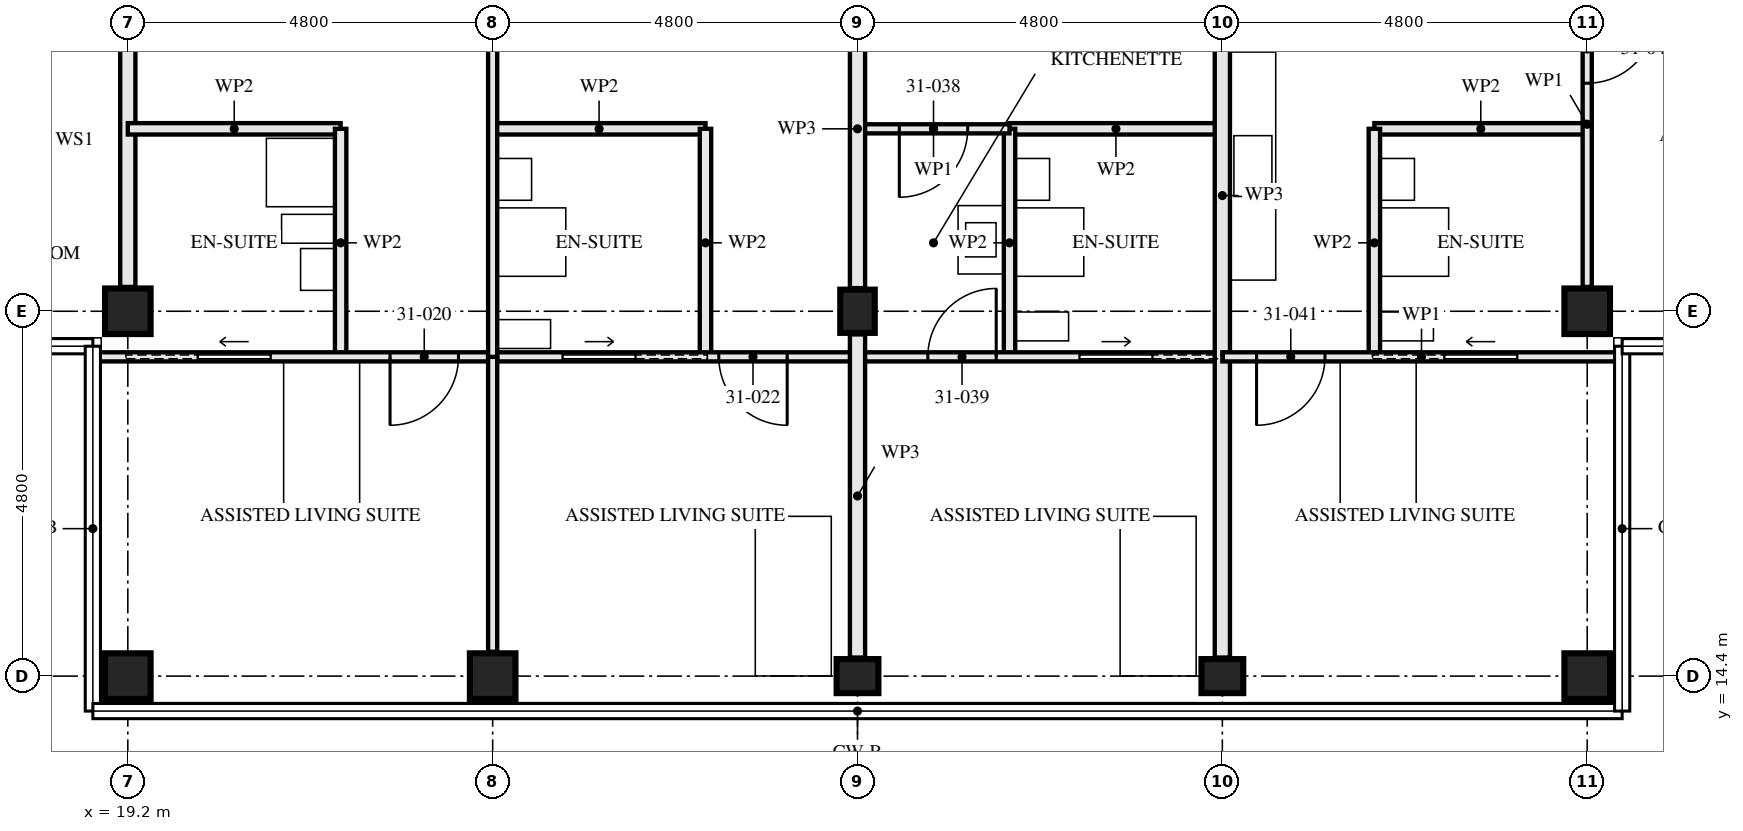
"""IFC4 building model, lengths in metres.
Left out: names, types, materials, properties, quantities, classifications, styles, units other than length and angle.
Written with IfcOpenShell. Run it as: python <this file> out.ifc"""

import sys

from ifc_helpers import new_model, si_unit, direction, frame, frame_2d, origin, origin_2d, place, context, subcontext, project, spatial, rectangle, hollow_rectangle, i_section, extrude, element, fill, save


model = new_model("IFC4")
c1 = context("Model", 3, precision=1e-05, world=origin(), true_north=direction((0.0, 1.0)))
c2 = subcontext(c1, "Body", "Model", "MODEL_VIEW")
j1 = project(units=[si_unit("LENGTHUNIT", "METRE"), si_unit("PLANEANGLEUNIT", "RADIAN")], contexts=[c1])
p1 = place(None, origin())
s1 = spatial("IfcSite", under=j1, at=p1, CompositionType="ELEMENT")
p2 = place(p1, origin())
s2 = spatial("IfcBuilding", under=s1, at=p2, CompositionType="ELEMENT")
p3 = place(p2, frame((0.0, 0.0, 115.5)))
s3 = spatial("IfcBuildingStorey", under=s2, at=p3, CompositionType="ELEMENT", Elevation=115.5)
for number, where, z_axis, x_axis in (
    (1, (19.2, 14.4, 0.0), (0.0, 0.0, 1.0), (0.0, 1.0, 0.0)),
    (2, (19.2, 19.2, 0.0), (0.0, 0.0, 1.0), (0.0, 1.0, 0.0)),
    (3, (24.0, 14.4, 0.0), (0.0, 0.0, 1.0), (0.0, 1.0, 0.0)),
):
    element("IfcColumn", number, at=place(p3, frame(where, z_axis=z_axis, x_axis=x_axis)), inside=s3, PredefinedType="COLUMN", context=c2, shape_type="SweptSolid", body=[
        extrude(hollow_rectangle(XDim=0.6, YDim=0.6, WallThickness=0.08, at=origin_2d()), origin(), (0.0, 0.0, 1.0), 3.5),
    ])
p4 = place(p3, frame((28.8, 14.4, 0.0), z_axis=(0.0, 0.0, 1.0), x_axis=(0.0, 1.0, 0.0)))
e4 = element("IfcColumn", 4, at=p4, inside=s3, PredefinedType="COLUMN", context=c2, shape_type="SweptSolid", body=[
    extrude(i_section(OverallWidth=0.448, OverallDepth=0.55, WebThickness=0.072, FlangeThickness=0.115, FilletRadius=0.015, at=origin_2d()), origin(), (0.0, 0.0, 1.0), 3.5),
])
p5 = place(p3, frame((28.8, 19.2, 0.0), z_axis=(0.0, 0.0, 1.0), x_axis=(1.0, 0.0, 0.0)))
e5 = element("IfcColumn", 5, at=p5, inside=s3, PredefinedType="COLUMN", context=c2, shape_type="SweptSolid", body=[
    extrude(i_section(OverallWidth=0.454, OverallDepth=0.569, WebThickness=0.078, FlangeThickness=0.125, FilletRadius=0.015, at=origin_2d()), origin(), (0.0, 0.0, 1.0), 3.5),
])
p6 = place(p3, frame((33.6, 14.4, 0.0), z_axis=(0.0, 0.0, 1.0), x_axis=(0.0, 1.0, 0.0)))
e6 = element("IfcColumn", 6, at=p6, inside=s3, PredefinedType="COLUMN", context=c2, shape_type="SweptSolid", body=[
    extrude(i_section(OverallWidth=0.448, OverallDepth=0.55, WebThickness=0.072, FlangeThickness=0.115, FilletRadius=0.015, at=origin_2d()), origin(), (0.0, 0.0, 1.0), 3.5),
])
for number, where, z_axis, x_axis in (
    (7, (38.4, 14.4, 0.0), (0.0, 0.0, 1.0), (0.0, 1.0, 0.0)),
    (8, (38.4, 19.2, 0.0), (0.0, 0.0, 1.0), (0.0, 1.0, 0.0)),
):
    element("IfcColumn", number, at=place(p3, frame(where, z_axis=z_axis, x_axis=x_axis)), inside=s3, PredefinedType="COLUMN", context=c2, shape_type="SweptSolid", body=[
        extrude(hollow_rectangle(XDim=0.6, YDim=0.6, WallThickness=0.05, at=origin_2d()), origin(), (0.0, 0.0, 1.0), 3.5),
    ])
p7 = place(p3, frame((19.2, 19.52, 0.0), z_axis=(0.0, 0.0, 1.0), x_axis=(0.0, 1.0, 0.0)))
e9 = element("IfcWall", 9, at=p7, inside=s3, PredefinedType="PARTITIONING", context=c2, shape_type="SweptSolid", body=[
    extrude(rectangle(XDim=7.28, YDim=0.2, at=frame_2d((3.64, 0.0))), origin(), (0.0, 0.0, 1.0), 2.55),
])
p8 = place(p3, frame((22.0, 18.6, 0.0), z_axis=(0.0, 0.0, 1.0), x_axis=(0.0, 1.0, 0.0)))
e10 = element("IfcWall", 10, at=p8, inside=s3, PredefinedType="PARTITIONING", context=c2, shape_type="SweptSolid", body=[
    extrude(rectangle(XDim=3.0, YDim=0.15, at=frame_2d((1.5, 0.0))), origin(), (0.0, 0.0, 1.0), 2.55),
])
p9 = place(p3, frame((19.2, 21.6, 0.0), z_axis=(0.0, 0.0, 1.0), x_axis=(1.0, 0.0, 0.0)))
e11 = element("IfcWall", 11, at=p9, inside=s3, PredefinedType="PARTITIONING", context=c2, shape_type="SweptSolid", body=[
    extrude(rectangle(XDim=2.8, YDim=0.15, at=frame_2d((1.4, 0.0))), origin(), (0.0, 0.0, 1.0), 3.33),
])
p10 = place(p3, frame((26.8, 18.6, 0.0), z_axis=(0.0, 0.0, 1.0), x_axis=(0.0, 1.0, 0.0)))
e12 = element("IfcWall", 12, at=p10, inside=s3, PredefinedType="PARTITIONING", context=c2, shape_type="SweptSolid", body=[
    extrude(rectangle(XDim=3.0, YDim=0.15, at=frame_2d((1.5, 0.0))), origin(), (0.0, 0.0, 1.0), 2.55),
])
p11 = place(p3, frame((24.0, 21.6, 0.0), z_axis=(0.0, 0.0, 1.0), x_axis=(1.0, 0.0, 0.0)))
e13 = element("IfcWall", 13, at=p11, inside=s3, PredefinedType="PARTITIONING", context=c2, shape_type="SweptSolid", body=[
    extrude(rectangle(XDim=2.8, YDim=0.15, at=frame_2d((1.4, 0.0))), origin(), (0.0, 0.0, 1.0), 3.33),
])
p12 = place(p3, frame((24.0, 18.6, 0.0), z_axis=(0.0, 0.0, 1.0), x_axis=(0.0, 1.0, 0.0)))
e14 = element("IfcWall", 14, at=p12, inside=s3, PredefinedType="PARTITIONING", context=c2, shape_type="SweptSolid", body=[
    extrude(rectangle(XDim=8.25, YDim=0.12, at=frame_2d((4.125, 0.0))), origin(), (0.0, 0.0, 1.0), 2.55),
])
p13 = place(p12, frame((5.15, 0.0, 0.0)))
e15 = element("IfcOpeningElement", 15, at=p13, cuts=e14, PredefinedType="OPENING", context=c2, shape_type="SweptSolid", body=[
    extrude(rectangle(XDim=0.9, YDim=2.1, at=frame_2d((0.45, 1.05))), frame((0.0, 0.071, 0.0), z_axis=(0.0, -1.0, 0.0), x_axis=(1.0, 0.0, 0.0)), (0.0, 0.0, 1.0), 0.141),
])
p14 = place(p3, frame((18.76, 18.6, 0.0), z_axis=(0.0, 0.0, 1.0), x_axis=(1.0, 0.0, 0.0)))
e16 = element("IfcWall", 16, at=p14, inside=s3, PredefinedType="PARTITIONING", context=c2, shape_type="SweptSolid", body=[
    extrude(rectangle(XDim=5.24, YDim=0.12, at=frame_2d((2.62, 0.0))), origin(), (0.0, 0.0, 1.0), 2.32),
])
p15 = place(p14, frame((3.89, 0.0, 0.0)))
e17 = element("IfcOpeningElement", 17, at=p15, cuts=e16, PredefinedType="OPENING", context=c2, shape_type="SweptSolid", body=[
    extrude(rectangle(XDim=0.9, YDim=2.1, at=frame_2d((0.45, 1.05))), frame((0.0, 0.071, 0.0), z_axis=(0.0, -1.0, 0.0), x_axis=(1.0, 0.0, 0.0)), (0.0, 0.0, 1.0), 0.141),
])
p16 = place(p14, frame((1.365, 0.0, 0.0)))
e18 = element("IfcOpeningElement", 18, at=p16, cuts=e16, PredefinedType="OPENING", context=c2, shape_type="SweptSolid", body=[
    extrude(rectangle(XDim=0.95, YDim=2.1, at=frame_2d((0.475, 1.05))), frame((0.0, 0.071, 0.0), z_axis=(0.0, -1.0, 0.0), x_axis=(1.0, 0.0, 0.0)), (0.0, 0.0, 1.0), 0.141),
])
p17 = place(p3, frame((24.0, 18.6, 0.0), z_axis=(0.0, 0.0, 1.0), x_axis=(1.0, 0.0, 0.0)))
e19 = element("IfcWall", 19, at=p17, inside=s3, PredefinedType="PARTITIONING", context=c2, shape_type="SweptSolid", body=[
    extrude(rectangle(XDim=4.8, YDim=0.12, at=frame_2d((2.4, 0.0))), origin(), (0.0, 0.0, 1.0), 3.33),
])
p18 = place(p17, frame((2.975, 0.0, 0.0)))
e20 = element("IfcOpeningElement", 20, at=p18, cuts=e19, PredefinedType="OPENING", context=c2, shape_type="SweptSolid", body=[
    extrude(rectangle(XDim=0.9, YDim=2.1, at=frame_2d((0.45, 1.05))), frame((0.0, 0.071, 0.0), z_axis=(0.0, -1.0, 0.0), x_axis=(1.0, 0.0, 0.0)), (0.0, 0.0, 1.0), 0.141),
])
p19 = place(p17, frame((0.925, 0.0, 0.0)))
e21 = element("IfcOpeningElement", 21, at=p19, cuts=e19, PredefinedType="OPENING", context=c2, shape_type="SweptSolid", body=[
    extrude(rectangle(XDim=0.95, YDim=2.1, at=frame_2d((0.475, 1.05))), frame((0.0, 0.071, 0.0), z_axis=(0.0, -1.0, 0.0), x_axis=(1.0, 0.0, 0.0)), (0.0, 0.0, 1.0), 0.141),
])
p20 = place(p3, frame((24.0, 14.72, 0.0), z_axis=(0.0, 0.0, 1.0), x_axis=(0.0, 1.0, 0.0)))
e22 = element("IfcWall", 22, at=p20, inside=s3, PredefinedType="PARTITIONING", context=c2, shape_type="SweptSolid", body=[
    extrude(rectangle(XDim=3.88, YDim=0.12, at=frame_2d((1.94, 0.0))), origin(), (0.0, 0.0, 1.0), 3.33),
])
p21 = place(p3, frame((30.8, 18.6, 0.0), z_axis=(0.0, 0.0, 1.0), x_axis=(0.0, 1.0, 0.0)))
e23 = element("IfcWall", 23, at=p21, inside=s3, PredefinedType="PARTITIONING", context=c2, shape_type="SweptSolid", body=[
    extrude(rectangle(XDim=3.0, YDim=0.15, at=frame_2d((1.5, 0.0))), origin(), (0.0, 0.0, 1.0), 2.55),
])
p22 = place(p3, frame((30.8, 21.6, 0.0), z_axis=(0.0, 0.0, 1.0), x_axis=(1.0, 0.0, 0.0)))
e24 = element("IfcWall", 24, at=p22, inside=s3, PredefinedType="PARTITIONING", context=c2, shape_type="SweptSolid", body=[
    extrude(rectangle(XDim=2.8, YDim=0.15, at=frame_2d((1.4, 0.0))), origin(), (0.0, 0.0, 1.0), 3.33),
])
p23 = place(p3, frame((28.8, 21.6, 0.0), z_axis=(0.0, 0.0, 1.0), x_axis=(1.0, 0.0, 0.0)))
e25 = element("IfcWall", 25, at=p23, inside=s3, PredefinedType="PARTITIONING", context=c2, shape_type="SweptSolid", body=[
    extrude(rectangle(XDim=2.0, YDim=0.12, at=frame_2d((1.0, 0.0))), origin(), (0.0, 0.0, 1.0), 3.33),
])
p24 = place(p23, frame((0.55, 0.0, 0.0)))
e26 = element("IfcOpeningElement", 26, at=p24, cuts=e25, PredefinedType="OPENING", context=c2, shape_type="SweptSolid", body=[
    extrude(rectangle(XDim=0.9, YDim=2.1, at=frame_2d((0.45, 1.05))), frame((0.0, 0.071, 0.0), z_axis=(0.0, -1.0, 0.0), x_axis=(1.0, 0.0, 0.0)), (0.0, 0.0, 1.0), 0.141),
])
p25 = place(p3, frame((28.8, 18.6, 0.0), z_axis=(0.0, 0.0, 1.0), x_axis=(1.0, 0.0, 0.0)))
e27 = element("IfcWall", 27, at=p25, inside=s3, PredefinedType="PARTITIONING", context=c2, shape_type="SweptSolid", body=[
    extrude(rectangle(XDim=4.8, YDim=0.12, at=frame_2d((2.4, 0.0))), origin(), (0.0, 0.0, 1.0), 3.33),
])
p26 = place(p25, frame((0.925, 0.0, 0.0)))
e28 = element("IfcOpeningElement", 28, at=p26, cuts=e27, PredefinedType="OPENING", context=c2, shape_type="SweptSolid", body=[
    extrude(rectangle(XDim=0.9, YDim=2.1, at=frame_2d((0.45, 1.05))), frame((0.0, 0.071, 0.0), z_axis=(0.0, -1.0, 0.0), x_axis=(1.0, 0.0, 0.0)), (0.0, 0.0, 1.0), 0.141),
])
p27 = place(p25, frame((2.925, 0.0, 0.0)))
e29 = element("IfcOpeningElement", 29, at=p27, cuts=e27, PredefinedType="OPENING", context=c2, shape_type="SweptSolid", body=[
    extrude(rectangle(XDim=0.95, YDim=2.1, at=frame_2d((0.475, 1.05))), frame((0.0, 0.071, 0.0), z_axis=(0.0, -1.0, 0.0), x_axis=(1.0, 0.0, 0.0)), (0.0, 0.0, 1.0), 0.141),
])
p28 = place(p3, frame((33.6, 14.644, 0.0), z_axis=(0.0, 0.0, 1.0), x_axis=(0.0, 1.0, 0.0)))
e30 = element("IfcWall", 30, at=p28, inside=s3, PredefinedType="PARTITIONING", context=c2, shape_type="SweptSolid", body=[
    extrude(rectangle(XDim=12.156, YDim=0.2, at=frame_2d((6.078, 0.0))), origin(), (0.0, 0.0, 1.0), 2.55),
])
p29 = place(p3, frame((35.6, 18.6, 0.0), z_axis=(0.0, 0.0, 1.0), x_axis=(0.0, 1.0, 0.0)))
e31 = element("IfcWall", 31, at=p29, inside=s3, PredefinedType="PARTITIONING", context=c2, shape_type="SweptSolid", body=[
    extrude(rectangle(XDim=3.0, YDim=0.15, at=frame_2d((1.5, 0.0))), origin(), (0.0, 0.0, 1.0), 2.55),
])
p30 = place(p3, frame((35.6, 21.6, 0.0), z_axis=(0.0, 0.0, 1.0), x_axis=(1.0, 0.0, 0.0)))
e32 = element("IfcWall", 32, at=p30, inside=s3, PredefinedType="PARTITIONING", context=c2, shape_type="SweptSolid", body=[
    extrude(rectangle(XDim=2.8, YDim=0.15, at=frame_2d((1.4, 0.0))), origin(), (0.0, 0.0, 1.0), 3.33),
])
p31 = place(p3, frame((33.6, 18.6, 0.0), z_axis=(0.0, 0.0, 1.0), x_axis=(1.0, 0.0, 0.0)))
e33 = element("IfcWall", 33, at=p31, inside=s3, PredefinedType="PARTITIONING", context=c2, shape_type="SweptSolid", body=[
    extrude(rectangle(XDim=5.24, YDim=0.12, at=frame_2d((2.62, 0.0))), origin(), (0.0, 0.0, 1.0), 2.32),
])
p32 = place(p31, frame((0.45, 0.0, 0.0)))
e34 = element("IfcOpeningElement", 34, at=p32, cuts=e33, PredefinedType="OPENING", context=c2, shape_type="SweptSolid", body=[
    extrude(rectangle(XDim=0.9, YDim=2.1, at=frame_2d((0.45, 1.05))), frame((0.0, 0.071, 0.0), z_axis=(0.0, -1.0, 0.0), x_axis=(1.0, 0.0, 0.0)), (0.0, 0.0, 1.0), 0.141),
])
p33 = place(p31, frame((2.925, 0.0, 0.0)))
e35 = element("IfcOpeningElement", 35, at=p33, cuts=e33, PredefinedType="OPENING", context=c2, shape_type="SweptSolid", body=[
    extrude(rectangle(XDim=0.95, YDim=2.1, at=frame_2d((0.475, 1.05))), frame((0.0, 0.071, 0.0), z_axis=(0.0, -1.0, 0.0), x_axis=(1.0, 0.0, 0.0)), (0.0, 0.0, 1.0), 0.141),
])
p34 = place(p3, frame((38.4, 19.52, 0.0), z_axis=(0.0, 0.0, 1.0), x_axis=(0.0, 1.0, 0.0)))
e36 = element("IfcWall", 36, at=p34, inside=s3, PredefinedType="PARTITIONING", context=c2, shape_type="SweptSolid", body=[
    extrude(rectangle(XDim=4.28, YDim=0.12, at=frame_2d((2.14, 0.0))), origin(), (0.0, 0.0, 1.0), 3.33),
])
p35 = place(p34, frame((2.68, 0.0, 0.0)))
e37 = element("IfcOpeningElement", 37, at=p35, cuts=e36, PredefinedType="OPENING", context=c2, shape_type="SweptSolid", body=[
    extrude(rectangle(XDim=0.9, YDim=2.1, at=frame_2d((0.45, 1.05))), frame((0.0, 0.071, 0.0), z_axis=(0.0, -1.0, 0.0), x_axis=(1.0, 0.0, 0.0)), (0.0, 0.0, 1.0), 0.141),
])
p36 = place(p3, frame((28.8, 14.644, 0.0), z_axis=(0.0, 0.0, 1.0), x_axis=(0.0, 1.0, 0.0)))
e38 = element("IfcWall", 38, at=p36, inside=s3, PredefinedType="PARTITIONING", context=c2, shape_type="SweptSolid", body=[
    extrude(rectangle(XDim=4.251, YDim=0.2, at=frame_2d((2.126, 0.0))), origin(), (0.0, 0.0, 1.0), 2.32),
])
p37 = place(p3, frame((28.8, 19.504, 0.0), z_axis=(0.0, 0.0, 1.0), x_axis=(0.0, 1.0, 0.0)))
e39 = element("IfcWall", 39, at=p37, inside=s3, PredefinedType="PARTITIONING", context=c2, shape_type="SweptSolid", body=[
    extrude(rectangle(XDim=4.191, YDim=0.2, at=frame_2d((2.096, 0.0))), origin(), (0.0, 0.0, 1.0), 2.32),
])
p38 = place(p15, frame((0.9, 0.0, 0.0), z_axis=(0.0, 0.0, 1.0), x_axis=(-1.0, 0.0, 0.0)))
e40 = element("IfcDoor", 40, at=p38, inside=s3, OperationType="SINGLE_SWING_LEFT", PredefinedType="DOOR", context=c2, shape_type="SweptSolid", body=[
    extrude(rectangle(XDim=0.9, YDim=2.1, at=frame_2d((0.45, 1.05))), frame((0.0, 0.022, 0.0), z_axis=(0.0, -1.0, 0.0), x_axis=(1.0, 0.0, 0.0)), (0.0, 0.0, 1.0), 0.044),
])
fill(e17, e40)
p39 = place(p16, origin())
e41 = element("IfcDoor", 41, at=p39, inside=s3, OperationType="SLIDING_TO_RIGHT", PredefinedType="DOOR", context=c2, shape_type="SweptSolid", body=[
    extrude(rectangle(XDim=0.95, YDim=2.1, at=frame_2d((0.475, 1.05))), frame((0.0, 0.022, 0.0), z_axis=(0.0, -1.0, 0.0), x_axis=(1.0, 0.0, 0.0)), (0.0, 0.0, 1.0), 0.044),
])
fill(e18, e41)
p40 = place(p18, frame((0.9, 0.0, 0.0), z_axis=(0.0, 0.0, 1.0), x_axis=(-1.0, 0.0, 0.0)))
e42 = element("IfcDoor", 42, at=p40, inside=s3, OperationType="SINGLE_SWING_RIGHT", PredefinedType="DOOR", context=c2, shape_type="SweptSolid", body=[
    extrude(rectangle(XDim=0.9, YDim=2.1, at=frame_2d((0.45, 1.05))), frame((0.0, 0.022, 0.0), z_axis=(0.0, -1.0, 0.0), x_axis=(1.0, 0.0, 0.0)), (0.0, 0.0, 1.0), 0.044),
])
fill(e20, e42)
p41 = place(p19, origin())
e43 = element("IfcDoor", 43, at=p41, inside=s3, OperationType="SLIDING_TO_LEFT", PredefinedType="DOOR", context=c2, shape_type="SweptSolid", body=[
    extrude(rectangle(XDim=0.95, YDim=2.1, at=frame_2d((0.475, 1.05))), frame((0.0, 0.022, 0.0), z_axis=(0.0, -1.0, 0.0), x_axis=(1.0, 0.0, 0.0)), (0.0, 0.0, 1.0), 0.044),
])
fill(e21, e43)
p42 = place(p24, frame((0.9, 0.0, 0.0), z_axis=(0.0, 0.0, 1.0), x_axis=(-1.0, 0.0, 0.0)))
e44 = element("IfcDoor", 44, at=p42, inside=s3, OperationType="SINGLE_SWING_LEFT", PredefinedType="DOOR", context=c2, shape_type="SweptSolid", body=[
    extrude(rectangle(XDim=0.9, YDim=2.1, at=frame_2d((0.45, 1.05))), frame((0.0, 0.022, 0.0), z_axis=(0.0, -1.0, 0.0), x_axis=(1.0, 0.0, 0.0)), (0.0, 0.0, 1.0), 0.044),
])
fill(e26, e44)
p43 = place(p26, origin())
e45 = element("IfcDoor", 45, at=p43, inside=s3, OperationType="SINGLE_SWING_LEFT", PredefinedType="DOOR", context=c2, shape_type="SweptSolid", body=[
    extrude(rectangle(XDim=0.9, YDim=2.1, at=frame_2d((0.45, 1.05))), frame((0.0, 0.022, 0.0), z_axis=(0.0, -1.0, 0.0), x_axis=(1.0, 0.0, 0.0)), (0.0, 0.0, 1.0), 0.044),
])
fill(e28, e45)
p44 = place(p27, origin())
e46 = element("IfcDoor", 46, at=p44, inside=s3, OperationType="SLIDING_TO_LEFT", PredefinedType="DOOR", context=c2, shape_type="SweptSolid", body=[
    extrude(rectangle(XDim=0.95, YDim=2.1, at=frame_2d((0.475, 1.05))), frame((0.0, 0.022, 0.0), z_axis=(0.0, -1.0, 0.0), x_axis=(1.0, 0.0, 0.0)), (0.0, 0.0, 1.0), 0.044),
])
fill(e29, e46)
p45 = place(p32, frame((0.9, 0.0, 0.0), z_axis=(0.0, 0.0, 1.0), x_axis=(-1.0, 0.0, 0.0)))
e47 = element("IfcDoor", 47, at=p45, inside=s3, OperationType="SINGLE_SWING_LEFT", PredefinedType="DOOR", context=c2, shape_type="SweptSolid", body=[
    extrude(rectangle(XDim=0.9, YDim=2.1, at=frame_2d((0.45, 1.05))), frame((0.0, 0.022, 0.0), z_axis=(0.0, -1.0, 0.0), x_axis=(1.0, 0.0, 0.0)), (0.0, 0.0, 1.0), 0.044),
])
fill(e34, e47)
p46 = place(p33, origin())
e48 = element("IfcDoor", 48, at=p46, inside=s3, OperationType="SLIDING_TO_RIGHT", PredefinedType="DOOR", context=c2, shape_type="SweptSolid", body=[
    extrude(rectangle(XDim=0.95, YDim=2.1, at=frame_2d((0.475, 1.05))), frame((0.0, 0.022, 0.0), z_axis=(0.0, -1.0, 0.0), x_axis=(1.0, 0.0, 0.0)), (0.0, 0.0, 1.0), 0.044),
])
fill(e35, e48)
p47 = place(p35, frame((0.9, 0.0, 0.0), z_axis=(0.0, 0.0, 1.0), x_axis=(-1.0, 0.0, 0.0)))
e49 = element("IfcDoor", 49, at=p47, inside=s3, OperationType="SINGLE_SWING_RIGHT", PredefinedType="DOOR", context=c2, shape_type="SweptSolid", body=[
    extrude(rectangle(XDim=0.9, YDim=2.1, at=frame_2d((0.45, 1.05))), frame((0.0, 0.022, 0.0), z_axis=(0.0, -1.0, 0.0), x_axis=(1.0, 0.0, 0.0)), (0.0, 0.0, 1.0), 0.044),
])
fill(e37, e49)
save(model, sys.argv[1])
